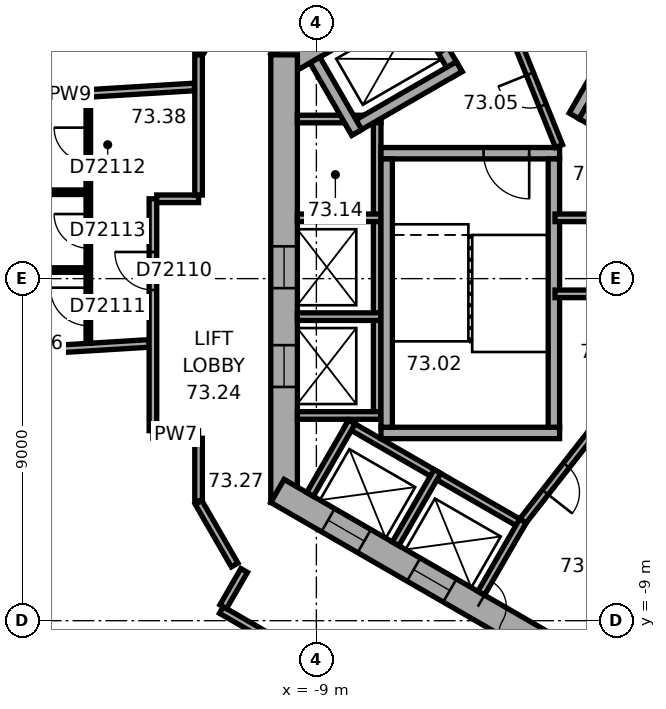
"""IFC4 building model, lengths in metres.
Left out: names, types, materials, properties, quantities, classifications, styles, units other than length and angle.
Written with IfcOpenShell. Run it as: python <this file> out.ifc"""

import sys

from ifc_helpers import new_model, si_unit, direction, frame, frame_2d, origin, place, context, subcontext, project, spatial, rectangle, extrude, element, fill, save


model = new_model("IFC4")
c1 = context("Model", 3, precision=1e-05, world=origin(), true_north=direction((0.0, 1.0)))
c2 = subcontext(c1, "Body", "Model", "MODEL_VIEW")
j1 = project(units=[si_unit("LENGTHUNIT", "METRE"), si_unit("PLANEANGLEUNIT", "RADIAN")], contexts=[c1])
p1 = place(None, origin())
s1 = spatial("IfcSite", under=j1, at=p1, CompositionType="ELEMENT")
p2 = place(p1, origin())
s2 = spatial("IfcBuilding", under=s1, at=p2, CompositionType="ELEMENT")
p3 = place(p2, frame((0.0, 0.0, 296.8)))
s3 = spatial("IfcBuildingStorey", under=s2, at=p3, CompositionType="ELEMENT", Elevation=296.8)
p4 = place(p3, frame((0.175, 11.475, 0.0), z_axis=(0.0, 0.0, 1.0), x_axis=(-0.866026453023, -0.499998182661, 0.0)))
e1 = element("IfcWall", 1, at=p4, inside=s3, PredefinedType="SHEAR", context=c2, shape_type="SweptSolid", body=[
    extrude(rectangle(XDim=11.778, YDim=0.7, at=frame_2d((5.889, 0.0))), origin(), (0.0, 0.0, 1.0), 3.7),
])
p5 = place(p4, frame((6.089, 0.0, 0.0)))
e2 = element("IfcOpeningElement", 2, at=p5, cuts=e1, PredefinedType="OPENING", context=c2, shape_type="SweptSolid", body=[
    extrude(rectangle(XDim=1.5, YDim=2.1, at=frame_2d((0.75, 1.05))), frame((0.0, 0.36, 0.0), z_axis=(0.0, -1.0, 0.0), x_axis=(1.0, 0.0, 0.0)), (0.0, 0.0, 1.0), 0.72),
])
p6 = place(p4, frame((2.939, 0.0, 0.0)))
e3 = element("IfcOpeningElement", 3, at=p6, cuts=e1, PredefinedType="OPENING", context=c2, shape_type="SweptSolid", body=[
    extrude(rectangle(XDim=0.9, YDim=2.1, at=frame_2d((0.45, 1.05))), frame((0.0, 0.36, 0.0), z_axis=(0.0, -1.0, 0.0), x_axis=(1.0, 0.0, 0.0)), (0.0, 0.0, 1.0), 0.72),
])
p7 = place(p3, frame((-9.85, 5.889, 0.0), z_axis=(0.0, 0.0, 1.0), x_axis=(0.0, -1.0, 0.0)))
e4 = element("IfcWall", 4, at=p7, inside=s3, PredefinedType="SHEAR", context=c2, shape_type="SweptSolid", body=[
    extrude(rectangle(XDim=11.778, YDim=0.7, at=frame_2d((5.889, 0.0))), origin(), (0.0, 0.0, 1.0), 3.7),
])
p8 = place(p7, frame((5.039, 0.0, 0.0)))
e5 = element("IfcOpeningElement", 5, at=p8, cuts=e4, PredefinedType="OPENING", context=c2, shape_type="SweptSolid", body=[
    extrude(rectangle(XDim=1.1, YDim=2.1, at=frame_2d((0.55, 1.05))), frame((0.0, 0.36, 0.0), z_axis=(0.0, -1.0, 0.0), x_axis=(1.0, 0.0, 0.0)), (0.0, 0.0, 1.0), 0.72),
])
p9 = place(p7, frame((7.639, 0.0, 0.0)))
e6 = element("IfcOpeningElement", 6, at=p9, cuts=e4, PredefinedType="OPENING", context=c2, shape_type="SweptSolid", body=[
    extrude(rectangle(XDim=1.1, YDim=2.1, at=frame_2d((0.55, 1.05))), frame((0.0, 0.36, 0.0), z_axis=(0.0, -1.0, 0.0), x_axis=(1.0, 0.0, 0.0)), (0.0, 0.0, 1.0), 0.72),
])
p10 = place(p3, frame((-10.025, -5.586, 0.0), z_axis=(0.0, 0.0, 1.0), x_axis=(0.866026453023, -0.499998182661, 0.0)))
e7 = element("IfcWall", 7, at=p10, inside=s3, PredefinedType="SHEAR", context=c2, shape_type="SweptSolid", body=[
    extrude(rectangle(XDim=11.778, YDim=0.7, at=frame_2d((5.889, 0.0))), origin(), (0.0, 0.0, 1.0), 3.7),
])
p11 = place(p10, frame((6.089, 0.0, 0.0)))
e8 = element("IfcOpeningElement", 8, at=p11, cuts=e7, PredefinedType="OPENING", context=c2, shape_type="SweptSolid", body=[
    extrude(rectangle(XDim=1.5, YDim=2.1, at=frame_2d((0.75, 1.05))), frame((0.0, 0.36, 0.0), z_axis=(0.0, -1.0, 0.0), x_axis=(1.0, 0.0, 0.0)), (0.0, 0.0, 1.0), 0.72),
])
p12 = place(p10, frame((1.539, 0.0, 0.0)))
e9 = element("IfcOpeningElement", 9, at=p12, cuts=e7, PredefinedType="OPENING", context=c2, shape_type="SweptSolid", body=[
    extrude(rectangle(XDim=1.1, YDim=2.1, at=frame_2d((0.55, 1.05))), frame((0.0, 0.36, 0.0), z_axis=(0.0, -1.0, 0.0), x_axis=(1.0, 0.0, 0.0)), (0.0, 0.0, 1.0), 0.72),
])
p13 = place(p10, frame((4.139, 0.0, 0.0)))
e10 = element("IfcOpeningElement", 10, at=p13, cuts=e7, PredefinedType="OPENING", context=c2, shape_type="SweptSolid", body=[
    extrude(rectangle(XDim=1.1, YDim=2.1, at=frame_2d((0.55, 1.05))), frame((0.0, 0.36, 0.0), z_axis=(0.0, -1.0, 0.0), x_axis=(1.0, 0.0, 0.0)), (0.0, 0.0, 1.0), 0.72),
])
p14 = place(p3, frame((-7.4, 4.3, 0.0), z_axis=(0.0, 0.0, 1.0), x_axis=(0.0, -1.0, 0.0)))
e11 = element("IfcWall", 11, at=p14, inside=s3, PredefinedType="PARTITIONING", context=c2, shape_type="SweptSolid", body=[
    extrude(rectangle(XDim=8.0, YDim=0.2, at=frame_2d((4.0, 0.0))), origin(), (0.0, 0.0, 1.0), 3.35),
])
for number, where, z_axis, x_axis in (
    (12, (-7.3, 4.2, 0.0), (0.0, 0.0, 1.0), (-1.0, 0.0, 0.0)),
    (13, (-7.3, 1.6, 0.0), (0.0, 0.0, 1.0), (-1.0, 0.0, 0.0)),
    (14, (-7.3, -1.0, 0.0), (0.0, 0.0, 1.0), (-1.0, 0.0, 0.0)),
    (15, (-7.3, -3.6, 0.0), (0.0, 0.0, 1.0), (-1.0, 0.0, 0.0)),
):
    element("IfcWall", number, at=place(p3, frame(where, z_axis=z_axis, x_axis=x_axis)), inside=s3, PredefinedType="PARTITIONING", context=c2, shape_type="SweptSolid", body=[
        extrude(rectangle(XDim=2.2, YDim=0.2, at=frame_2d((1.1, 0.0))), origin(), (0.0, 0.0, 1.0), 3.35),
    ])
p15 = place(p3, frame((-8.203, -3.809, 0.0), z_axis=(0.0, 0.0, 1.0), x_axis=(0.866028230842, -0.499995103361, 0.0)))
e16 = element("IfcWall", 16, at=p15, inside=s3, PredefinedType="PARTITIONING", context=c2, shape_type="SweptSolid", body=[
    extrude(rectangle(XDim=5.4, YDim=0.2, at=frame_2d((2.7, 0.0))), origin(), (0.0, 0.0, 1.0), 3.35),
])
for number, where, z_axis, x_axis in (
    (17, (-8.067, -3.772, 0.0), (0.0, 0.0, 1.0), (-0.5, -0.866, 0.0)),
    (18, (-5.815, -5.072, 0.0), (0.0, 0.0, 1.0), (-0.5, -0.866, 0.0)),
):
    element("IfcWall", number, at=place(p3, frame(where, z_axis=z_axis, x_axis=x_axis)), inside=s3, PredefinedType="PARTITIONING", context=c2, shape_type="SweptSolid", body=[
        extrude(rectangle(XDim=2.2, YDim=0.2, at=frame_2d((1.1, 0.0))), origin(), (0.0, 0.0, 1.0), 3.35),
    ])
p16 = place(p3, frame((-3.563, -6.372, 0.0), z_axis=(0.0, 0.0, 1.0), x_axis=(-0.499994660107, -0.866028486751, 0.0)))
e19 = element("IfcWall", 19, at=p16, inside=s3, PredefinedType="PARTITIONING", context=c2, shape_type="SweptSolid", body=[
    extrude(rectangle(XDim=2.2, YDim=0.2, at=frame_2d((1.1, 0.0))), origin(), (0.0, 0.0, 1.0), 3.35),
])
p17 = place(p3, frame((-2.216, 4.282, 0.0), z_axis=(0.0, 0.0, 1.0), x_axis=(0.499977259774, 0.866038532462, 0.0)))
e20 = element("IfcWall", 20, at=p17, inside=s3, PredefinedType="SHEAR", context=c2, shape_type="SweptSolid", body=[
    extrude(rectangle(XDim=4.7, YDim=0.3, at=frame_2d((2.35, 0.0))), origin(), (0.0, 0.0, 1.0), 3.35),
])
p18 = place(p3, frame((4.103, 0.807, 0.0), z_axis=(0.0, 0.0, 1.0), x_axis=(-0.866027801685, 0.499995846692, 0.0)))
e21 = element("IfcWall", 21, at=p18, inside=s3, PredefinedType="SHEAR", context=c2, shape_type="SweptSolid", body=[
    extrude(rectangle(XDim=7.06, YDim=0.3, at=frame_2d((3.53, 0.0))), origin(), (0.0, 0.0, 1.0), 3.35),
])
p19 = place(p3, frame((-2.6, 3.3, 0.0), z_axis=(0.0, 0.0, 1.0), x_axis=(-1.0, 0.0, 0.0)))
e22 = element("IfcWall", 22, at=p19, inside=s3, PredefinedType="SHEAR", context=c2, shape_type="SweptSolid", body=[
    extrude(rectangle(XDim=4.7, YDim=0.3, at=frame_2d((2.35, 0.0))), origin(), (0.0, 0.0, 1.0), 3.35),
])
p20 = place(p19, frame((0.8, 0.0, 0.0)))
e23 = element("IfcOpeningElement", 23, at=p20, cuts=e22, PredefinedType="OPENING", context=c2, shape_type="SweptSolid", body=[
    extrude(rectangle(XDim=1.2, YDim=2.1, at=frame_2d((0.6, 1.05))), frame((0.0, 0.16, 0.0), z_axis=(0.0, -1.0, 0.0), x_axis=(1.0, 0.0, 0.0)), (0.0, 0.0, 1.0), 0.32),
])
p21 = place(p3, frame((-2.6, -4.06, 0.0), z_axis=(0.0, 0.0, 1.0), x_axis=(-1.0, 0.0, 0.0)))
e24 = element("IfcWall", 24, at=p21, inside=s3, PredefinedType="SHEAR", context=c2, shape_type="SweptSolid", body=[
    extrude(rectangle(XDim=4.7, YDim=0.3, at=frame_2d((2.35, 0.0))), origin(), (0.0, 0.0, 1.0), 3.35),
])
for number, where, z_axis, x_axis in (
    (25, (-2.75, 3.15, 0.0), (0.0, 0.0, 1.0), (0.0, -1.0, 0.0)),
    (26, (-7.15, 3.15, 0.0), (0.0, 0.0, 1.0), (0.0, -1.0, 0.0)),
):
    element("IfcWall", number, at=place(p3, frame(where, z_axis=z_axis, x_axis=x_axis)), inside=s3, PredefinedType="SHEAR", context=c2, shape_type="SweptSolid", body=[
        extrude(rectangle(XDim=7.06, YDim=0.3, at=frame_2d((3.53, 0.0))), origin(), (0.0, 0.0, 1.0), 3.35),
    ])
p22 = place(p3, frame((-5.295, 5.372, 0.0), z_axis=(0.0, 0.0, 1.0), x_axis=(-0.500077893725, 0.86598042715, 0.0)))
e27 = element("IfcWall", 27, at=p22, inside=s3, PredefinedType="SHEAR", context=c2, shape_type="SweptSolid", body=[
    extrude(rectangle(XDim=2.2, YDim=0.3, at=frame_2d((1.1, 0.0))), origin(), (0.0, 0.0, 1.0), 3.35),
])
p23 = place(p22, frame((0.7, 0.0, 0.0)))
e28 = element("IfcOpeningElement", 28, at=p23, cuts=e27, PredefinedType="OPENING", context=c2, shape_type="SweptSolid", body=[
    extrude(rectangle(XDim=1.1, YDim=2.1, at=frame_2d((0.55, 1.05))), frame((0.0, 0.16, 0.0), z_axis=(0.0, -1.0, 0.0), x_axis=(1.0, 0.0, 0.0)), (0.0, 0.0, 1.0), 0.32),
])
p24 = place(p3, frame((-5.24, 5.577, 0.0), z_axis=(0.0, 0.0, 1.0), x_axis=(-0.866014461049, -0.500018952895, 0.0)))
e29 = element("IfcWall", 29, at=p24, inside=s3, PredefinedType="SHEAR", context=c2, shape_type="SweptSolid", body=[
    extrude(rectangle(XDim=3.35, YDim=0.3, at=frame_2d((1.675, 0.0))), origin(), (0.0, 0.0, 1.0), 3.35),
])
p25 = place(p3, frame((-7.937, 3.847, 0.0), z_axis=(0.0, 0.0, 1.0), x_axis=(-0.50002983664, 0.866008176907, 0.0)))
e30 = element("IfcWall", 30, at=p25, inside=s3, PredefinedType="SHEAR", context=c2, shape_type="SweptSolid", body=[
    extrude(rectangle(XDim=2.2, YDim=0.3, at=frame_2d((1.1, 0.0))), origin(), (0.0, 0.0, 1.0), 3.35),
])
p26 = place(p3, frame((-2.615, 3.487, 0.0), z_axis=(0.0, 0.0, 1.0), x_axis=(-0.373576831041, 0.92759924068, 0.0)))
e31 = element("IfcWall", 31, at=p26, inside=s3, PredefinedType="PARTITIONING", context=c2, shape_type="SweptSolid", body=[
    extrude(rectangle(XDim=3.002, YDim=0.2, at=frame_2d((1.501, 0.0))), origin(), (0.0, 0.0, 1.0), 3.35),
])
p27 = place(p26, frame((1.15, 0.0, 0.0)))
e32 = element("IfcOpeningElement", 32, at=p27, cuts=e31, PredefinedType="OPENING", context=c2, shape_type="SweptSolid", body=[
    extrude(rectangle(XDim=0.9, YDim=2.1, at=frame_2d((0.45, 1.05))), frame((0.0, 0.11, 0.0), z_axis=(0.0, -1.0, 0.0), x_axis=(1.0, 0.0, 0.0)), (0.0, 0.0, 1.0), 0.22),
])
p28 = place(p3, frame((-1.712, -4.008, 0.0), z_axis=(0.0, 0.0, 1.0), x_axis=(-0.616549420702, -0.787316208287, 0.0)))
e33 = element("IfcWall", 33, at=p28, inside=s3, PredefinedType="PARTITIONING", context=c2, shape_type="SweptSolid", body=[
    extrude(rectangle(XDim=3.002, YDim=0.2, at=frame_2d((1.501, 0.0))), origin(), (0.0, 0.0, 1.0), 3.35),
])
p29 = place(p28, frame((1.15, 0.0, 0.0)))
e34 = element("IfcOpeningElement", 34, at=p29, cuts=e33, PredefinedType="OPENING", context=c2, shape_type="SweptSolid", body=[
    extrude(rectangle(XDim=0.9, YDim=2.1, at=frame_2d((0.45, 1.05))), frame((0.0, 0.11, 0.0), z_axis=(0.0, -1.0, 0.0), x_axis=(1.0, 0.0, 0.0)), (0.0, 0.0, 1.0), 0.22),
])
p30 = place(p3, frame((-2.72, -0.4, 0.0), z_axis=(0.0, 0.0, 1.0), x_axis=(1.0, 0.0, 0.0)))
e35 = element("IfcWall", 35, at=p30, inside=s3, PredefinedType="PARTITIONING", context=c2, shape_type="SweptSolid", body=[
    extrude(rectangle(XDim=7.347, YDim=0.2, at=frame_2d((3.674, 0.0))), origin(), (0.0, 0.0, 1.0), 3.35),
])
p31 = place(p3, frame((-2.72, 1.6, 0.0), z_axis=(0.0, 0.0, 1.0), x_axis=(1.0, 0.0, 0.0)))
e36 = element("IfcWall", 36, at=p31, inside=s3, PredefinedType="PARTITIONING", context=c2, shape_type="SweptSolid", body=[
    extrude(rectangle(XDim=5.269, YDim=0.2, at=frame_2d((2.634, 0.0))), origin(), (0.0, 0.0, 1.0), 3.35),
])
p32 = place(p3, frame((-19.324, 2.273, 0.0), z_axis=(0.0, 0.0, 1.0), x_axis=(1.0, 0.0, 0.0)))
e37 = element("IfcWall", 37, at=p32, inside=s3, PredefinedType="PARTITIONING", context=c2, shape_type="SweptSolid", body=[
    extrude(rectangle(XDim=4.263, YDim=0.12, at=frame_2d((2.132, 0.0))), origin(), (0.0, 0.0, 1.0), 3.35),
])
p33 = place(p3, frame((-18.768, 4.643, 0.0), z_axis=(0.0, 0.0, 1.0), x_axis=(0.99813496285, 0.0610458511, 0.0)))
e38 = element("IfcWall", 38, at=p33, inside=s3, PredefinedType="PARTITIONING", context=c2, shape_type="SweptSolid", body=[
    extrude(rectangle(XDim=6.571, YDim=0.2, at=frame_2d((3.285, 0.0))), origin(), (0.0, 0.0, 1.0), 3.35),
])
p34 = place(p3, frame((-18.362, -2.008, 0.0), z_axis=(0.0, 0.0, 1.0), x_axis=(0.998135748374, 0.061033005966, 0.0)))
e39 = element("IfcWall", 39, at=p34, inside=s3, PredefinedType="PARTITIONING", context=c2, shape_type="SweptSolid", body=[
    extrude(rectangle(XDim=4.96, YDim=0.2, at=frame_2d((2.48, 0.0))), origin(), (0.0, 0.0, 1.0), 3.35),
])
p35 = place(p3, frame((-15.061, 0.226, 0.0), z_axis=(0.0, 0.0, 1.0), x_axis=(-1.0, 0.0, 0.0)))
e40 = element("IfcWall", 40, at=p35, inside=s3, PredefinedType="PARTITIONING", context=c2, shape_type="SweptSolid", body=[
    extrude(rectangle(XDim=2.68, YDim=0.12, at=frame_2d((1.34, 0.0))), origin(), (0.0, 0.0, 1.0), 3.35),
])
p36 = place(p3, frame((-15.001, 4.773, 0.0), z_axis=(0.0, 0.0, 1.0), x_axis=(0.0, -1.0, 0.0)))
e41 = element("IfcWall", 41, at=p36, inside=s3, PredefinedType="PARTITIONING", context=c2, shape_type="SweptSolid", body=[
    extrude(rectangle(XDim=6.476, YDim=0.12, at=frame_2d((3.238, 0.0))), origin(), (0.0, 0.0, 1.0), 3.35),
])
p37 = place(p36, frame((5.011, 0.0, 0.0)))
e42 = element("IfcOpeningElement", 42, at=p37, cuts=e41, PredefinedType="OPENING", context=c2, shape_type="SweptSolid", body=[
    extrude(rectangle(XDim=1.0, YDim=2.1, at=frame_2d((0.5, 1.05))), frame((0.0, 0.07, 0.0), z_axis=(0.0, -1.0, 0.0), x_axis=(1.0, 0.0, 0.0)), (0.0, 0.0, 1.0), 0.14),
])
p38 = place(p36, frame((0.8, 0.0, 0.0)))
e43 = element("IfcOpeningElement", 43, at=p38, cuts=e41, PredefinedType="OPENING", context=c2, shape_type="SweptSolid", body=[
    extrude(rectangle(XDim=0.9, YDim=2.1, at=frame_2d((0.45, 1.05))), frame((0.0, 0.07, 0.0), z_axis=(0.0, -1.0, 0.0), x_axis=(1.0, 0.0, 0.0)), (0.0, 0.0, 1.0), 0.14),
])
p39 = place(p36, frame((3.073, 0.0, 0.0)))
e44 = element("IfcOpeningElement", 44, at=p39, cuts=e41, PredefinedType="OPENING", context=c2, shape_type="SweptSolid", body=[
    extrude(rectangle(XDim=0.9, YDim=2.1, at=frame_2d((0.45, 1.05))), frame((0.0, 0.07, 0.0), z_axis=(0.0, -1.0, 0.0), x_axis=(1.0, 0.0, 0.0)), (0.0, 0.0, 1.0), 0.14),
])
p40 = place(p3, frame((-13.301, -4.101, 0.0), z_axis=(0.0, 0.0, 1.0), x_axis=(1.0, 0.0, 0.0)))
e45 = element("IfcWall", 45, at=p40, inside=s3, PredefinedType="PARTITIONING", context=c2, shape_type="SweptSolid", body=[
    extrude(rectangle(XDim=1.201, YDim=0.2, at=frame_2d((0.601, 0.0))), origin(), (0.0, 0.0, 1.0), 3.35),
])
p41 = place(p3, frame((-13.301, 2.101, 0.0), z_axis=(0.0, 0.0, 1.0), x_axis=(0.0, -1.0, 0.0)))
e46 = element("IfcWall", 46, at=p41, inside=s3, PredefinedType="PARTITIONING", context=c2, shape_type="SweptSolid", body=[
    extrude(rectangle(XDim=6.102, YDim=0.2, at=frame_2d((3.051, 0.0))), origin(), (0.0, 0.0, 1.0), 3.35),
])
p42 = place(p41, frame((1.4, 0.0, 0.0)))
e47 = element("IfcOpeningElement", 47, at=p42, cuts=e46, PredefinedType="OPENING", context=c2, shape_type="SweptSolid", body=[
    extrude(rectangle(XDim=1.0, YDim=2.1, at=frame_2d((0.5, 1.05))), frame((0.0, 0.11, 0.0), z_axis=(0.0, -1.0, 0.0), x_axis=(1.0, 0.0, 0.0)), (0.0, 0.0, 1.0), 0.22),
])
p43 = place(p3, frame((-12.1, -5.889, 0.0), z_axis=(0.0, 0.0, 1.0), x_axis=(0.500063520245, -0.865988727248, 0.0)))
e48 = element("IfcWall", 48, at=p43, inside=s3, PredefinedType="PARTITIONING", context=c2, shape_type="SweptSolid", body=[
    extrude(rectangle(XDim=1.9, YDim=0.2, at=frame_2d((0.95, 0.0))), origin(), (0.0, 0.0, 1.0), 3.35),
])
p44 = place(p3, frame((-12.1, -4.201, 0.0), z_axis=(0.0, 0.0, 1.0), x_axis=(0.0, -1.0, 0.0)))
e49 = element("IfcWall", 49, at=p44, inside=s3, PredefinedType="PARTITIONING", context=c2, shape_type="SweptSolid", body=[
    extrude(rectangle(XDim=1.648, YDim=0.2, at=frame_2d((0.824, 0.0))), origin(), (0.0, 0.0, 1.0), 3.35),
])
p45 = place(p3, frame((-12.1, 2.101, 0.0), z_axis=(0.0, 0.0, 1.0), x_axis=(-1.0, 0.0, 0.0)))
e50 = element("IfcWall", 50, at=p45, inside=s3, PredefinedType="PARTITIONING", context=c2, shape_type="SweptSolid", body=[
    extrude(rectangle(XDim=1.101, YDim=0.2, at=frame_2d((0.55, 0.0))), origin(), (0.0, 0.0, 1.0), 3.35),
])
p46 = place(p3, frame((-12.1, 5.889, 0.0), z_axis=(0.0, 0.0, 1.0), x_axis=(0.0, -1.0, 0.0)))
e51 = element("IfcWall", 51, at=p46, inside=s3, PredefinedType="PARTITIONING", context=c2, shape_type="SweptSolid", body=[
    extrude(rectangle(XDim=3.688, YDim=0.2, at=frame_2d((1.844, 0.0))), origin(), (0.0, 0.0, 1.0), 3.35),
])
p47 = place(p3, frame((-11.501, -8.719, 0.0), z_axis=(0.0, 0.0, 1.0), x_axis=(0.866024434742, -0.500001678427, 0.0)))
e52 = element("IfcWall", 52, at=p47, inside=s3, PredefinedType="PARTITIONING", context=c2, shape_type="SweptSolid", body=[
    extrude(rectangle(XDim=4.718, YDim=0.2, at=frame_2d((2.359, 0.0))), origin(), (0.0, 0.0, 1.0), 3.35),
])
p48 = place(p3, frame((-11.15, 7.534, 0.0), z_axis=(0.0, 0.0, 1.0), x_axis=(-0.500063286585, -0.865988862174, 0.0)))
e53 = element("IfcWall", 53, at=p48, inside=s3, PredefinedType="PARTITIONING", context=c2, shape_type="SweptSolid", body=[
    extrude(rectangle(XDim=1.86, YDim=0.2, at=frame_2d((0.93, 0.0))), origin(), (0.0, 0.0, 1.0), 3.35),
])
p49 = place(p48, frame((0.43, 0.0, 0.0)))
e54 = element("IfcOpeningElement", 54, at=p49, cuts=e53, PredefinedType="OPENING", context=c2, shape_type="SweptSolid", body=[
    extrude(rectangle(XDim=1.0, YDim=2.1, at=frame_2d((0.5, 1.05))), frame((0.0, 0.11, 0.0), z_axis=(0.0, -1.0, 0.0), x_axis=(1.0, 0.0, 0.0)), (0.0, 0.0, 1.0), 0.22),
])
p50 = place(p3, frame((-10.901, -7.678, 0.0), z_axis=(0.0, 0.0, 1.0), x_axis=(-0.500074377092, -0.865982457891, 0.0)))
e55 = element("IfcWall", 55, at=p50, inside=s3, PredefinedType="PARTITIONING", context=c2, shape_type="SweptSolid", body=[
    extrude(rectangle(XDim=1.101, YDim=0.2, at=frame_2d((0.55, 0.0))), origin(), (0.0, 0.0, 1.0), 3.35),
])
p51 = place(p11, origin())
e56 = element("IfcDoor", 56, at=p51, inside=s3, OperationType="DOUBLE_DOOR_SINGLE_SWING", PredefinedType="DOOR", context=c2, shape_type="SweptSolid", body=[
    extrude(rectangle(XDim=1.5, YDim=2.1, at=frame_2d((0.75, 1.05))), frame((0.0, 0.025, 0.0), z_axis=(0.0, -1.0, 0.0), x_axis=(1.0, 0.0, 0.0)), (0.0, 0.0, 1.0), 0.05),
])
fill(e8, e56)
p52 = place(p20, origin())
e57 = element("IfcDoor", 57, at=p52, inside=s3, OperationType="SINGLE_SWING_RIGHT", PredefinedType="DOOR", context=c2, shape_type="SweptSolid", body=[
    extrude(rectangle(XDim=1.2, YDim=2.1, at=frame_2d((0.6, 1.05))), frame((0.0, 0.025, 0.0), z_axis=(0.0, -1.0, 0.0), x_axis=(1.0, 0.0, 0.0)), (0.0, 0.0, 1.0), 0.05),
])
fill(e23, e57)
p53 = place(p27, origin())
e58 = element("IfcDoor", 58, at=p53, inside=s3, OperationType="SINGLE_SWING_LEFT", PredefinedType="DOOR", context=c2, shape_type="SweptSolid", body=[
    extrude(rectangle(XDim=0.9, YDim=2.1, at=frame_2d((0.45, 1.05))), frame((0.0, 0.025, 0.0), z_axis=(0.0, -1.0, 0.0), x_axis=(1.0, 0.0, 0.0)), (0.0, 0.0, 1.0), 0.05),
])
fill(e32, e58)
p54 = place(p29, origin())
e59 = element("IfcDoor", 59, at=p54, inside=s3, OperationType="SINGLE_SWING_LEFT", PredefinedType="DOOR", context=c2, shape_type="SweptSolid", body=[
    extrude(rectangle(XDim=0.9, YDim=2.1, at=frame_2d((0.45, 1.05))), frame((0.0, 0.025, 0.0), z_axis=(0.0, -1.0, 0.0), x_axis=(1.0, 0.0, 0.0)), (0.0, 0.0, 1.0), 0.05),
])
fill(e34, e59)
p55 = place(p8, origin())
e60 = element("IfcDoor", 60, at=p55, inside=s3, OperationType="DOUBLE_DOOR_SLIDING", PredefinedType="DOOR", context=c2, shape_type="SweptSolid", body=[
    extrude(rectangle(XDim=1.1, YDim=2.1, at=frame_2d((0.55, 1.05))), frame((0.0, 0.025, 0.0), z_axis=(0.0, -1.0, 0.0), x_axis=(1.0, 0.0, 0.0)), (0.0, 0.0, 1.0), 0.05),
])
fill(e5, e60)
p56 = place(p9, origin())
e61 = element("IfcDoor", 61, at=p56, inside=s3, OperationType="DOUBLE_DOOR_SLIDING", PredefinedType="DOOR", context=c2, shape_type="SweptSolid", body=[
    extrude(rectangle(XDim=1.1, YDim=2.1, at=frame_2d((0.55, 1.05))), frame((0.0, 0.025, 0.0), z_axis=(0.0, -1.0, 0.0), x_axis=(1.0, 0.0, 0.0)), (0.0, 0.0, 1.0), 0.05),
])
fill(e6, e61)
p57 = place(p12, origin())
e62 = element("IfcDoor", 62, at=p57, inside=s3, OperationType="DOUBLE_DOOR_SLIDING", PredefinedType="DOOR", context=c2, shape_type="SweptSolid", body=[
    extrude(rectangle(XDim=1.1, YDim=2.1, at=frame_2d((0.55, 1.05))), frame((0.0, 0.025, 0.0), z_axis=(0.0, -1.0, 0.0), x_axis=(1.0, 0.0, 0.0)), (0.0, 0.0, 1.0), 0.05),
])
fill(e9, e62)
p58 = place(p13, origin())
e63 = element("IfcDoor", 63, at=p58, inside=s3, OperationType="DOUBLE_DOOR_SLIDING", PredefinedType="DOOR", context=c2, shape_type="SweptSolid", body=[
    extrude(rectangle(XDim=1.1, YDim=2.1, at=frame_2d((0.55, 1.05))), frame((0.0, 0.025, 0.0), z_axis=(0.0, -1.0, 0.0), x_axis=(1.0, 0.0, 0.0)), (0.0, 0.0, 1.0), 0.05),
])
fill(e10, e63)
p59 = place(p42, origin())
e64 = element("IfcDoor", 64, at=p59, inside=s3, OperationType="SINGLE_SWING_LEFT", PredefinedType="DOOR", context=c2, shape_type="SweptSolid", body=[
    extrude(rectangle(XDim=1.0, YDim=2.1, at=frame_2d((0.5, 1.05))), frame((0.0, 0.025, 0.0), z_axis=(0.0, -1.0, 0.0), x_axis=(1.0, 0.0, 0.0)), (0.0, 0.0, 1.0), 0.05),
])
fill(e47, e64)
p60 = place(p37, origin())
e65 = element("IfcDoor", 65, at=p60, inside=s3, OperationType="SINGLE_SWING_LEFT", PredefinedType="DOOR", context=c2, shape_type="SweptSolid", body=[
    extrude(rectangle(XDim=1.0, YDim=2.1, at=frame_2d((0.5, 1.05))), frame((0.0, 0.025, 0.0), z_axis=(0.0, -1.0, 0.0), x_axis=(1.0, 0.0, 0.0)), (0.0, 0.0, 1.0), 0.05),
])
fill(e42, e65)
p61 = place(p38, origin())
e66 = element("IfcDoor", 66, at=p61, inside=s3, OperationType="SINGLE_SWING_LEFT", PredefinedType="DOOR", context=c2, shape_type="SweptSolid", body=[
    extrude(rectangle(XDim=0.9, YDim=2.1, at=frame_2d((0.45, 1.05))), frame((0.0, 0.025, 0.0), z_axis=(0.0, -1.0, 0.0), x_axis=(1.0, 0.0, 0.0)), (0.0, 0.0, 1.0), 0.05),
])
fill(e43, e66)
p62 = place(p39, origin())
e67 = element("IfcDoor", 67, at=p62, inside=s3, OperationType="SINGLE_SWING_LEFT", PredefinedType="DOOR", context=c2, shape_type="SweptSolid", body=[
    extrude(rectangle(XDim=0.9, YDim=2.1, at=frame_2d((0.45, 1.05))), frame((0.0, 0.025, 0.0), z_axis=(0.0, -1.0, 0.0), x_axis=(1.0, 0.0, 0.0)), (0.0, 0.0, 1.0), 0.05),
])
fill(e44, e67)
save(model, sys.argv[1])
